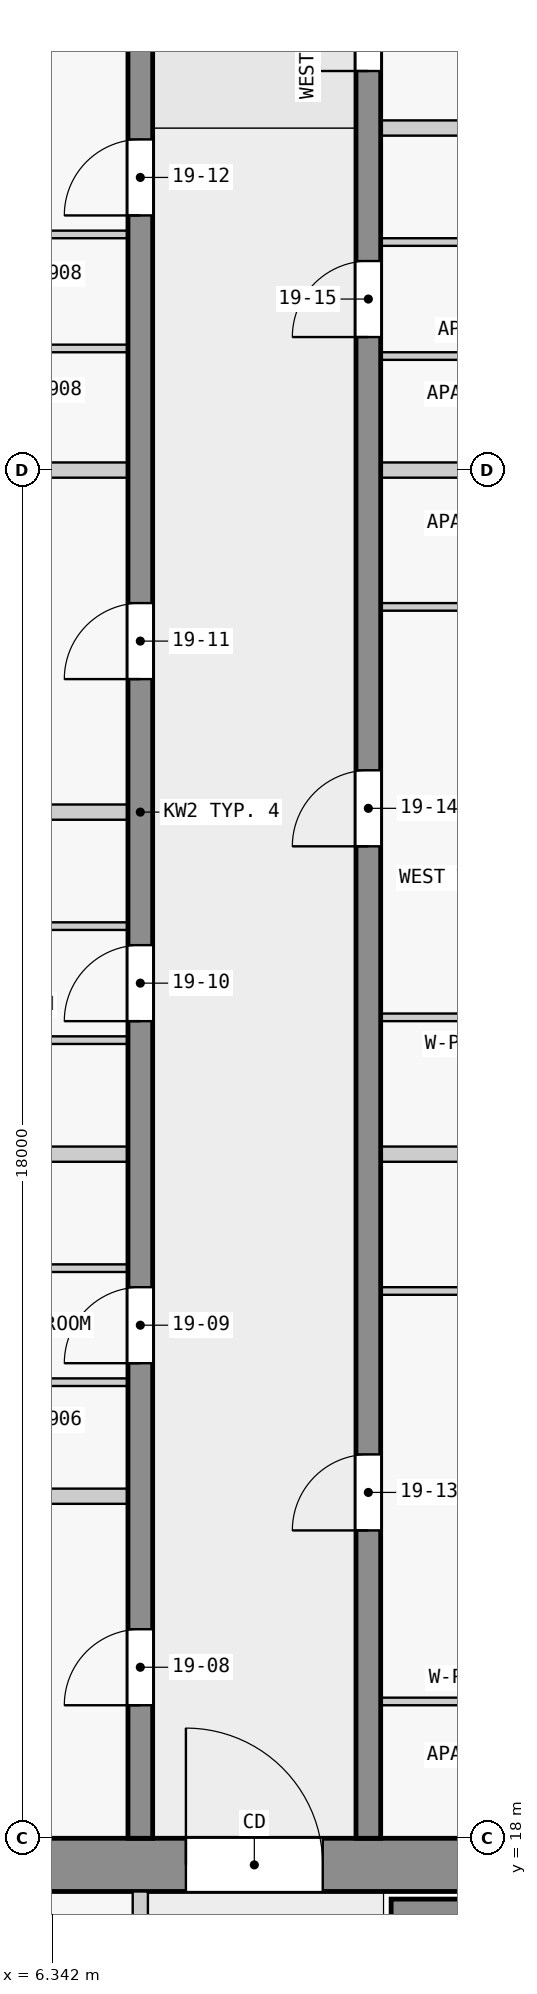
"""IFC4 building model, lengths in metres.
Left out: names, types, materials, properties, quantities, classifications, styles, units other than length and angle.
Written with IfcOpenShell. Run it as: python <this file> out.ifc"""

import sys

from ifc_helpers import new_model, si_unit, direction, frame, frame_2d, origin, place, context, subcontext, project, spatial, rectangle, extrude, element, fill, save


model = new_model("IFC4")
c1 = context("Model", 3, precision=1e-05, world=origin(), true_north=direction((0.0, 1.0)))
c2 = subcontext(c1, "Body", "Model", "MODEL_VIEW")
j1 = project(units=[si_unit("LENGTHUNIT", "METRE"), si_unit("PLANEANGLEUNIT", "RADIAN")], contexts=[c1])
p1 = place(None, origin())
s1 = spatial("IfcSite", under=j1, at=p1, CompositionType="ELEMENT")
p2 = place(p1, origin())
s2 = spatial("IfcBuilding", under=s1, at=p2, CompositionType="ELEMENT")
p3 = place(p2, frame((0.0, 0.0, 78.3)))
s3 = spatial("IfcBuildingStorey", under=s2, at=p3, CompositionType="ELEMENT", Elevation=78.3)
p4 = place(p3, frame((1.6, 17.65, 0.0), z_axis=(0.0, 0.0, 1.0), x_axis=(1.0, 0.0, 0.0)))
e1 = element("IfcWall", 1, at=p4, inside=s3, PredefinedType="SHEAR", context=c2, shape_type="SweptSolid", body=[
    extrude(rectangle(XDim=20.9, YDim=0.7, at=frame_2d((10.45, 0.0))), origin(), (0.0, 0.0, 1.0), 3.25),
])
p5 = place(p4, frame((6.5, 0.0, 0.0)))
e2 = element("IfcOpeningElement", 2, at=p5, cuts=e1, PredefinedType="OPENING", context=c2, shape_type="SweptSolid", body=[
    extrude(rectangle(XDim=1.8, YDim=2.1, at=frame_2d((0.9, 1.05))), frame((0.0, 0.36, 0.0), z_axis=(0.0, -1.0, 0.0), x_axis=(1.0, 0.0, 0.0)), (0.0, 0.0, 1.0), 0.72),
])
p6 = place(p3, frame((10.8, 17.05, 0.0), z_axis=(0.0, 0.0, 1.0), x_axis=(1.0, 0.0, 0.0)))
e3 = element("IfcWall", 3, at=p6, inside=s3, PredefinedType="SHEAR", context=c2, shape_type="SweptSolid", body=[
    extrude(rectangle(XDim=7.8, YDim=0.3, at=frame_2d((3.9, 0.0))), origin(), (0.0, 0.0, 1.0), 3.25),
])
p7 = place(p3, frame((7.5, 18.0, 0.0), z_axis=(0.0, 0.0, 1.0), x_axis=(0.0, 1.0, 0.0)))
e4 = element("IfcWall", 4, at=p7, inside=s3, PredefinedType="SHEAR", context=c2, shape_type="SweptSolid", body=[
    extrude(rectangle(XDim=27.0, YDim=0.325, at=frame_2d((13.5, 0.0))), origin(), (0.0, 0.0, 1.0), 3.25),
])
p8 = place(p7, frame((1.75, 0.0, 0.0)))
e5 = element("IfcOpeningElement", 5, at=p8, cuts=e4, PredefinedType="OPENING", context=c2, shape_type="SweptSolid", body=[
    extrude(rectangle(XDim=1.0, YDim=2.1, at=frame_2d((0.5, 1.05))), frame((0.0, 0.172, 0.0), z_axis=(0.0, -1.0, 0.0), x_axis=(1.0, 0.0, 0.0)), (0.0, 0.0, 1.0), 0.345),
])
p9 = place(p7, frame((6.25, 0.0, 0.0)))
e6 = element("IfcOpeningElement", 6, at=p9, cuts=e4, PredefinedType="OPENING", context=c2, shape_type="SweptSolid", body=[
    extrude(rectangle(XDim=1.0, YDim=2.1, at=frame_2d((0.5, 1.05))), frame((0.0, 0.172, 0.0), z_axis=(0.0, -1.0, 0.0), x_axis=(1.0, 0.0, 0.0)), (0.0, 0.0, 1.0), 0.345),
])
p10 = place(p7, frame((10.75, 0.0, 0.0)))
e7 = element("IfcOpeningElement", 7, at=p10, cuts=e4, PredefinedType="OPENING", context=c2, shape_type="SweptSolid", body=[
    extrude(rectangle(XDim=1.0, YDim=2.1, at=frame_2d((0.5, 1.05))), frame((0.0, 0.172, 0.0), z_axis=(0.0, -1.0, 0.0), x_axis=(1.0, 0.0, 0.0)), (0.0, 0.0, 1.0), 0.345),
])
p11 = place(p7, frame((15.25, 0.0, 0.0)))
e8 = element("IfcOpeningElement", 8, at=p11, cuts=e4, PredefinedType="OPENING", context=c2, shape_type="SweptSolid", body=[
    extrude(rectangle(XDim=1.0, YDim=2.1, at=frame_2d((0.5, 1.05))), frame((0.0, 0.172, 0.0), z_axis=(0.0, -1.0, 0.0), x_axis=(1.0, 0.0, 0.0)), (0.0, 0.0, 1.0), 0.345),
])
p12 = place(p7, frame((21.35, 0.0, 0.0)))
e9 = element("IfcOpeningElement", 9, at=p12, cuts=e4, PredefinedType="OPENING", context=c2, shape_type="SweptSolid", body=[
    extrude(rectangle(XDim=1.0, YDim=2.1, at=frame_2d((0.5, 1.05))), frame((0.0, 0.172, 0.0), z_axis=(0.0, -1.0, 0.0), x_axis=(1.0, 0.0, 0.0)), (0.0, 0.0, 1.0), 0.345),
])
p13 = place(p3, frame((10.5, 18.0, 0.0), z_axis=(0.0, 0.0, 1.0), x_axis=(0.0, 1.0, 0.0)))
e10 = element("IfcWall", 10, at=p13, inside=s3, PredefinedType="SHEAR", context=c2, shape_type="SweptSolid", body=[
    extrude(rectangle(XDim=27.0, YDim=0.325, at=frame_2d((13.5, 0.0))), origin(), (0.0, 0.0, 1.0), 3.25),
])
p14 = place(p13, frame((4.05, 0.0, 0.0)))
e11 = element("IfcOpeningElement", 11, at=p14, cuts=e10, PredefinedType="OPENING", context=c2, shape_type="SweptSolid", body=[
    extrude(rectangle(XDim=1.0, YDim=2.1, at=frame_2d((0.5, 1.05))), frame((0.0, 0.172, 0.0), z_axis=(0.0, -1.0, 0.0), x_axis=(1.0, 0.0, 0.0)), (0.0, 0.0, 1.0), 0.345),
])
p15 = place(p13, frame((13.05, 0.0, 0.0)))
e12 = element("IfcOpeningElement", 12, at=p15, cuts=e10, PredefinedType="OPENING", context=c2, shape_type="SweptSolid", body=[
    extrude(rectangle(XDim=1.0, YDim=2.1, at=frame_2d((0.5, 1.05))), frame((0.0, 0.172, 0.0), z_axis=(0.0, -1.0, 0.0), x_axis=(1.0, 0.0, 0.0)), (0.0, 0.0, 1.0), 0.345),
])
p16 = place(p13, frame((19.75, 0.0, 0.0)))
e13 = element("IfcOpeningElement", 13, at=p16, cuts=e10, PredefinedType="OPENING", context=c2, shape_type="SweptSolid", body=[
    extrude(rectangle(XDim=1.0, YDim=2.1, at=frame_2d((0.5, 1.05))), frame((0.0, 0.172, 0.0), z_axis=(0.0, -1.0, 0.0), x_axis=(1.0, 0.0, 0.0)), (0.0, 0.0, 1.0), 0.345),
])
p17 = place(p13, frame((23.25, 0.0, 0.0)))
e14 = element("IfcOpeningElement", 14, at=p17, cuts=e10, PredefinedType="OPENING", context=c2, shape_type="SweptSolid", body=[
    extrude(rectangle(XDim=0.9, YDim=2.1, at=frame_2d((0.45, 1.05))), frame((0.0, 0.172, 0.0), z_axis=(0.0, -1.0, 0.0), x_axis=(1.0, 0.0, 0.0)), (0.0, 0.0, 1.0), 0.345),
])
p18 = place(p13, frame((25.45, 0.0, 0.0)))
e15 = element("IfcOpeningElement", 15, at=p18, cuts=e10, PredefinedType="OPENING", context=c2, shape_type="SweptSolid", body=[
    extrude(rectangle(XDim=1.0, YDim=2.1, at=frame_2d((0.5, 1.05))), frame((0.0, 0.172, 0.0), z_axis=(0.0, -1.0, 0.0), x_axis=(1.0, 0.0, 0.0)), (0.0, 0.0, 1.0), 0.345),
])
p19 = place(p3, frame((7.5, 10.1, 0.0), z_axis=(0.0, 0.0, 1.0), x_axis=(0.0, 1.0, 0.0)))
e16 = element("IfcWall", 16, at=p19, inside=s3, PredefinedType="PARTITIONING", context=c2, shape_type="SweptSolid", body=[
    extrude(rectangle(XDim=7.2, YDim=0.2, at=frame_2d((3.6, 0.0))), origin(), (0.0, 0.0, 1.0), 3.25),
])
p20 = place(p19, frame((0.75, 0.0, 0.0)))
e17 = element("IfcOpeningElement", 17, at=p20, cuts=e16, PredefinedType="OPENING", context=c2, shape_type="SweptSolid", body=[
    extrude(rectangle(XDim=0.9, YDim=2.1, at=frame_2d((0.45, 1.05))), frame((0.0, 0.11, 0.0), z_axis=(0.0, -1.0, 0.0), x_axis=(1.0, 0.0, 0.0)), (0.0, 0.0, 1.0), 0.22),
])
p21 = place(p19, frame((4.35, 0.0, 0.0)))
e18 = element("IfcOpeningElement", 18, at=p21, cuts=e16, PredefinedType="OPENING", context=c2, shape_type="SweptSolid", body=[
    extrude(rectangle(XDim=0.9, YDim=2.1, at=frame_2d((0.45, 1.05))), frame((0.0, 0.11, 0.0), z_axis=(0.0, -1.0, 0.0), x_axis=(1.0, 0.0, 0.0)), (0.0, 0.0, 1.0), 0.22),
])
p22 = place(p3, frame((14.062, 19.8, 0.0), z_axis=(0.0, 0.0, 1.0), x_axis=(-1.0, 0.0, 0.0)))
e19 = element("IfcWall", 19, at=p22, inside=s3, PredefinedType="PARTITIONING", context=c2, shape_type="SweptSolid", body=[
    extrude(rectangle(XDim=3.4, YDim=0.1, at=frame_2d((1.7, 0.0))), origin(), (0.0, 0.0, 1.0), 3.25),
])
p23 = place(p22, frame((1.25, 0.0, 0.0)))
e20 = element("IfcOpeningElement", 20, at=p23, cuts=e19, PredefinedType="OPENING", context=c2, shape_type="SweptSolid", body=[
    extrude(rectangle(XDim=0.9, YDim=2.1, at=frame_2d((0.45, 1.05))), frame((0.0, 0.06, 0.0), z_axis=(0.0, -1.0, 0.0), x_axis=(1.0, 0.0, 0.0)), (0.0, 0.0, 1.0), 0.12),
])
p24 = place(p3, frame((7.337, 22.5, 0.0), z_axis=(0.0, 0.0, 1.0), x_axis=(-1.0, 0.0, 0.0)))
e21 = element("IfcWall", 21, at=p24, inside=s3, PredefinedType="PARTITIONING", context=c2, shape_type="SweptSolid", body=[
    extrude(rectangle(XDim=7.188, YDim=0.2, at=frame_2d((3.594, 0.0))), origin(), (0.0, 0.0, 1.0), 3.25),
])
p25 = place(p3, frame((7.337, 24.0, 0.0), z_axis=(0.0, 0.0, 1.0), x_axis=(-1.0, 0.0, 0.0)))
e22 = element("IfcWall", 22, at=p25, inside=s3, PredefinedType="PARTITIONING", context=c2, shape_type="SweptSolid", body=[
    extrude(rectangle(XDim=3.4, YDim=0.1, at=frame_2d((1.7, 0.0))), origin(), (0.0, 0.0, 1.0), 3.25),
])
p26 = place(p25, frame((1.25, 0.0, 0.0)))
e23 = element("IfcOpeningElement", 23, at=p26, cuts=e22, PredefinedType="OPENING", context=c2, shape_type="SweptSolid", body=[
    extrude(rectangle(XDim=0.9, YDim=2.1, at=frame_2d((0.45, 1.05))), frame((0.0, 0.06, 0.0), z_axis=(0.0, -1.0, 0.0), x_axis=(1.0, 0.0, 0.0)), (0.0, 0.0, 1.0), 0.12),
])
p27 = place(p3, frame((10.663, 25.2, 0.0), z_axis=(0.0, 0.0, 1.0), x_axis=(1.0, 0.0, 0.0)))
e24 = element("IfcWall", 24, at=p27, inside=s3, PredefinedType="PARTITIONING", context=c2, shape_type="SweptSolid", body=[
    extrude(rectangle(XDim=3.35, YDim=0.1, at=frame_2d((1.675, 0.0))), origin(), (0.0, 0.0, 1.0), 3.25),
])
p28 = place(p27, frame((1.25, 0.0, 0.0)))
e25 = element("IfcOpeningElement", 25, at=p28, cuts=e24, PredefinedType="OPENING", context=c2, shape_type="SweptSolid", body=[
    extrude(rectangle(XDim=0.9, YDim=2.1, at=frame_2d((0.45, 1.05))), frame((0.0, 0.06, 0.0), z_axis=(0.0, -1.0, 0.0), x_axis=(1.0, 0.0, 0.0)), (0.0, 0.0, 1.0), 0.12),
])
p29 = place(p3, frame((3.938, 25.5, 0.0), z_axis=(0.0, 0.0, 1.0), x_axis=(1.0, 0.0, 0.0)))
e26 = element("IfcWall", 26, at=p29, inside=s3, PredefinedType="PARTITIONING", context=c2, shape_type="SweptSolid", body=[
    extrude(rectangle(XDim=3.4, YDim=0.1, at=frame_2d((1.7, 0.0))), origin(), (0.0, 0.0, 1.0), 3.25),
])
p30 = place(p29, frame((1.25, 0.0, 0.0)))
e27 = element("IfcOpeningElement", 27, at=p30, cuts=e26, PredefinedType="OPENING", context=c2, shape_type="SweptSolid", body=[
    extrude(rectangle(XDim=0.9, YDim=2.1, at=frame_2d((0.45, 1.05))), frame((0.0, 0.06, 0.0), z_axis=(0.0, -1.0, 0.0), x_axis=(1.0, 0.0, 0.0)), (0.0, 0.0, 1.0), 0.12),
])
for number, where, z_axis, x_axis in (
    (28, (7.337, 27.0, 0.0), (0.0, 0.0, 1.0), (-1.0, 0.0, 0.0)),
    (29, (13.962, 27.0, 0.0), (0.0, 0.0, 1.0), (-1.0, 0.0, 0.0)),
):
    element("IfcWall", number, at=place(p3, frame(where, z_axis=z_axis, x_axis=x_axis)), inside=s3, PredefinedType="PARTITIONING", context=c2, shape_type="SweptSolid", body=[
        extrude(rectangle(XDim=3.3, YDim=0.2, at=frame_2d((1.65, 0.0))), origin(), (0.0, 0.0, 1.0), 3.25),
    ])
p31 = place(p3, frame((7.337, 28.5, 0.0), z_axis=(0.0, 0.0, 1.0), x_axis=(-1.0, 0.0, 0.0)))
e30 = element("IfcWall", 30, at=p31, inside=s3, PredefinedType="PARTITIONING", context=c2, shape_type="SweptSolid", body=[
    extrude(rectangle(XDim=3.4, YDim=0.1, at=frame_2d((1.7, 0.0))), origin(), (0.0, 0.0, 1.0), 3.25),
])
p32 = place(p31, frame((1.25, 0.0, 0.0)))
e31 = element("IfcOpeningElement", 31, at=p32, cuts=e30, PredefinedType="OPENING", context=c2, shape_type="SweptSolid", body=[
    extrude(rectangle(XDim=0.9, YDim=2.1, at=frame_2d((0.45, 1.05))), frame((0.0, 0.06, 0.0), z_axis=(0.0, -1.0, 0.0), x_axis=(1.0, 0.0, 0.0)), (0.0, 0.0, 1.0), 0.12),
])
p33 = place(p3, frame((14.012, 28.8, 0.0), z_axis=(0.0, 0.0, 1.0), x_axis=(-1.0, 0.0, 0.0)))
e32 = element("IfcWall", 32, at=p33, inside=s3, PredefinedType="PARTITIONING", context=c2, shape_type="SweptSolid", body=[
    extrude(rectangle(XDim=3.35, YDim=0.1, at=frame_2d((1.675, 0.0))), origin(), (0.0, 0.0, 1.0), 3.25),
])
p34 = place(p33, frame((1.25, 0.0, 0.0)))
e33 = element("IfcOpeningElement", 33, at=p34, cuts=e32, PredefinedType="OPENING", context=c2, shape_type="SweptSolid", body=[
    extrude(rectangle(XDim=0.9, YDim=2.1, at=frame_2d((0.45, 1.05))), frame((0.0, 0.06, 0.0), z_axis=(0.0, -1.0, 0.0), x_axis=(1.0, 0.0, 0.0)), (0.0, 0.0, 1.0), 0.12),
])
p35 = place(p3, frame((3.938, 30.0, 0.0), z_axis=(0.0, 0.0, 1.0), x_axis=(1.0, 0.0, 0.0)))
e34 = element("IfcWall", 34, at=p35, inside=s3, PredefinedType="PARTITIONING", context=c2, shape_type="SweptSolid", body=[
    extrude(rectangle(XDim=3.4, YDim=0.1, at=frame_2d((1.7, 0.0))), origin(), (0.0, 0.0, 1.0), 3.25),
])
p36 = place(p35, frame((1.25, 0.0, 0.0)))
e35 = element("IfcOpeningElement", 35, at=p36, cuts=e34, PredefinedType="OPENING", context=c2, shape_type="SweptSolid", body=[
    extrude(rectangle(XDim=0.9, YDim=2.1, at=frame_2d((0.45, 1.05))), frame((0.0, 0.06, 0.0), z_axis=(0.0, -1.0, 0.0), x_axis=(1.0, 0.0, 0.0)), (0.0, 0.0, 1.0), 0.12),
])
p37 = place(p3, frame((7.337, 31.5, 0.0), z_axis=(0.0, 0.0, 1.0), x_axis=(-1.0, 0.0, 0.0)))
e36 = element("IfcWall", 36, at=p37, inside=s3, PredefinedType="PARTITIONING", context=c2, shape_type="SweptSolid", body=[
    extrude(rectangle(XDim=3.3, YDim=0.2, at=frame_2d((1.65, 0.0))), origin(), (0.0, 0.0, 1.0), 3.25),
])
p38 = place(p3, frame((10.663, 34.2, 0.0), z_axis=(0.0, 0.0, 1.0), x_axis=(1.0, 0.0, 0.0)))
e37 = element("IfcWall", 37, at=p38, inside=s3, PredefinedType="PARTITIONING", context=c2, shape_type="SweptSolid", body=[
    extrude(rectangle(XDim=3.4, YDim=0.1, at=frame_2d((1.7, 0.0))), origin(), (0.0, 0.0, 1.0), 3.25),
])
p39 = place(p38, frame((1.25, 0.0, 0.0)))
e38 = element("IfcOpeningElement", 38, at=p39, cuts=e37, PredefinedType="OPENING", context=c2, shape_type="SweptSolid", body=[
    extrude(rectangle(XDim=0.9, YDim=2.1, at=frame_2d((0.45, 1.05))), frame((0.0, 0.06, 0.0), z_axis=(0.0, -1.0, 0.0), x_axis=(1.0, 0.0, 0.0)), (0.0, 0.0, 1.0), 0.12),
])
p40 = place(p3, frame((7.337, 36.0, 0.0), z_axis=(0.0, 0.0, 1.0), x_axis=(-1.0, 0.0, 0.0)))
e39 = element("IfcWall", 39, at=p40, inside=s3, PredefinedType="PARTITIONING", context=c2, shape_type="SweptSolid", body=[
    extrude(rectangle(XDim=5.938, YDim=0.2, at=frame_2d((2.969, 0.0))), origin(), (0.0, 0.0, 1.0), 3.25),
])
p41 = place(p3, frame((14.062, 36.0, 0.0), z_axis=(0.0, 0.0, 1.0), x_axis=(-1.0, 0.0, 0.0)))
e40 = element("IfcWall", 40, at=p41, inside=s3, PredefinedType="PARTITIONING", context=c2, shape_type="SweptSolid", body=[
    extrude(rectangle(XDim=3.4, YDim=0.2, at=frame_2d((1.7, 0.0))), origin(), (0.0, 0.0, 1.0), 3.25),
])
p42 = place(p3, frame((14.062, 37.5, 0.0), z_axis=(0.0, 0.0, 1.0), x_axis=(-1.0, 0.0, 0.0)))
e41 = element("IfcWall", 41, at=p42, inside=s3, PredefinedType="PARTITIONING", context=c2, shape_type="SweptSolid", body=[
    extrude(rectangle(XDim=3.4, YDim=0.1, at=frame_2d((1.7, 0.0))), origin(), (0.0, 0.0, 1.0), 3.25),
])
p43 = place(p42, frame((1.25, 0.0, 0.0)))
e42 = element("IfcOpeningElement", 42, at=p43, cuts=e41, PredefinedType="OPENING", context=c2, shape_type="SweptSolid", body=[
    extrude(rectangle(XDim=0.9, YDim=2.1, at=frame_2d((0.45, 1.05))), frame((0.0, 0.06, 0.0), z_axis=(0.0, -1.0, 0.0), x_axis=(1.0, 0.0, 0.0)), (0.0, 0.0, 1.0), 0.12),
])
p44 = place(p3, frame((7.337, 37.6, 0.0), z_axis=(0.0, 0.0, 1.0), x_axis=(-1.0, 0.0, 0.0)))
e43 = element("IfcWall", 43, at=p44, inside=s3, PredefinedType="PARTITIONING", context=c2, shape_type="SweptSolid", body=[
    extrude(rectangle(XDim=3.4, YDim=0.1, at=frame_2d((1.7, 0.0))), origin(), (0.0, 0.0, 1.0), 3.25),
])
p45 = place(p3, frame((10.663, 39.0, 0.0), z_axis=(0.0, 0.0, 1.0), x_axis=(1.0, 0.0, 0.0)))
e44 = element("IfcWall", 44, at=p45, inside=s3, PredefinedType="PARTITIONING", context=c2, shape_type="SweptSolid", body=[
    extrude(rectangle(XDim=3.4, YDim=0.1, at=frame_2d((1.7, 0.0))), origin(), (0.0, 0.0, 1.0), 3.25),
])
p46 = place(p45, frame((1.25, 0.0, 0.0)))
e45 = element("IfcOpeningElement", 45, at=p46, cuts=e44, PredefinedType="OPENING", context=c2, shape_type="SweptSolid", body=[
    extrude(rectangle(XDim=0.9, YDim=2.1, at=frame_2d((0.45, 1.05))), frame((0.0, 0.06, 0.0), z_axis=(0.0, -1.0, 0.0), x_axis=(1.0, 0.0, 0.0)), (0.0, 0.0, 1.0), 0.12),
])
p47 = place(p3, frame((7.337, 39.1, 0.0), z_axis=(0.0, 0.0, 1.0), x_axis=(-1.0, 0.0, 0.0)))
e46 = element("IfcWall", 46, at=p47, inside=s3, PredefinedType="PARTITIONING", context=c2, shape_type="SweptSolid", body=[
    extrude(rectangle(XDim=3.4, YDim=0.1, at=frame_2d((1.7, 0.0))), origin(), (0.0, 0.0, 1.0), 3.25),
])
p48 = place(p47, frame((1.25, 0.0, 0.0)))
e47 = element("IfcOpeningElement", 47, at=p48, cuts=e46, PredefinedType="OPENING", context=c2, shape_type="SweptSolid", body=[
    extrude(rectangle(XDim=0.9, YDim=2.1, at=frame_2d((0.45, 1.05))), frame((0.0, 0.06, 0.0), z_axis=(0.0, -1.0, 0.0), x_axis=(1.0, 0.0, 0.0)), (0.0, 0.0, 1.0), 0.12),
])
p49 = place(p3, frame((13.962, 40.5, 0.0), z_axis=(0.0, 0.0, 1.0), x_axis=(-1.0, 0.0, 0.0)))
e48 = element("IfcWall", 48, at=p49, inside=s3, PredefinedType="PARTITIONING", context=c2, shape_type="SweptSolid", body=[
    extrude(rectangle(XDim=3.3, YDim=0.2, at=frame_2d((1.65, 0.0))), origin(), (0.0, 0.0, 1.0), 3.25),
])
p50 = place(p5, origin())
e49 = element("IfcDoor", 49, at=p50, inside=s3, OperationType="DOUBLE_DOOR_SINGLE_SWING", PredefinedType="DOOR", context=c2, shape_type="SweptSolid", body=[
    extrude(rectangle(XDim=1.8, YDim=2.1, at=frame_2d((0.9, 1.05))), frame((0.0, 0.025, 0.0), z_axis=(0.0, -1.0, 0.0), x_axis=(1.0, 0.0, 0.0)), (0.0, 0.0, 1.0), 0.05),
])
fill(e2, e49)
p51 = place(p8, origin())
e50 = element("IfcDoor", 50, at=p51, inside=s3, OperationType="SINGLE_SWING_LEFT", PredefinedType="DOOR", context=c2, shape_type="SweptSolid", body=[
    extrude(rectangle(XDim=1.0, YDim=2.1, at=frame_2d((0.5, 1.05))), frame((0.0, 0.025, 0.0), z_axis=(0.0, -1.0, 0.0), x_axis=(1.0, 0.0, 0.0)), (0.0, 0.0, 1.0), 0.05),
])
fill(e5, e50)
p52 = place(p9, origin())
e51 = element("IfcDoor", 51, at=p52, inside=s3, OperationType="SINGLE_SWING_LEFT", PredefinedType="DOOR", context=c2, shape_type="SweptSolid", body=[
    extrude(rectangle(XDim=1.0, YDim=2.1, at=frame_2d((0.5, 1.05))), frame((0.0, 0.025, 0.0), z_axis=(0.0, -1.0, 0.0), x_axis=(1.0, 0.0, 0.0)), (0.0, 0.0, 1.0), 0.05),
])
fill(e6, e51)
p53 = place(p10, origin())
e52 = element("IfcDoor", 52, at=p53, inside=s3, OperationType="SINGLE_SWING_LEFT", PredefinedType="DOOR", context=c2, shape_type="SweptSolid", body=[
    extrude(rectangle(XDim=1.0, YDim=2.1, at=frame_2d((0.5, 1.05))), frame((0.0, 0.025, 0.0), z_axis=(0.0, -1.0, 0.0), x_axis=(1.0, 0.0, 0.0)), (0.0, 0.0, 1.0), 0.05),
])
fill(e7, e52)
p54 = place(p11, origin())
e53 = element("IfcDoor", 53, at=p54, inside=s3, OperationType="SINGLE_SWING_RIGHT", PredefinedType="DOOR", context=c2, shape_type="SweptSolid", body=[
    extrude(rectangle(XDim=1.0, YDim=2.1, at=frame_2d((0.5, 1.05))), frame((0.0, 0.025, 0.0), z_axis=(0.0, -1.0, 0.0), x_axis=(1.0, 0.0, 0.0)), (0.0, 0.0, 1.0), 0.05),
])
fill(e8, e53)
p55 = place(p12, origin())
e54 = element("IfcDoor", 54, at=p55, inside=s3, OperationType="SINGLE_SWING_RIGHT", PredefinedType="DOOR", context=c2, shape_type="SweptSolid", body=[
    extrude(rectangle(XDim=1.0, YDim=2.1, at=frame_2d((0.5, 1.05))), frame((0.0, 0.025, 0.0), z_axis=(0.0, -1.0, 0.0), x_axis=(1.0, 0.0, 0.0)), (0.0, 0.0, 1.0), 0.05),
])
fill(e9, e54)
p56 = place(p14, origin())
e55 = element("IfcDoor", 55, at=p56, inside=s3, OperationType="SINGLE_SWING_LEFT", PredefinedType="DOOR", context=c2, shape_type="SweptSolid", body=[
    extrude(rectangle(XDim=1.0, YDim=2.1, at=frame_2d((0.5, 1.05))), frame((0.0, 0.025, 0.0), z_axis=(0.0, -1.0, 0.0), x_axis=(1.0, 0.0, 0.0)), (0.0, 0.0, 1.0), 0.05),
])
fill(e11, e55)
p57 = place(p15, origin())
e56 = element("IfcDoor", 56, at=p57, inside=s3, OperationType="SINGLE_SWING_RIGHT", PredefinedType="DOOR", context=c2, shape_type="SweptSolid", body=[
    extrude(rectangle(XDim=1.0, YDim=2.1, at=frame_2d((0.5, 1.05))), frame((0.0, 0.025, 0.0), z_axis=(0.0, -1.0, 0.0), x_axis=(1.0, 0.0, 0.0)), (0.0, 0.0, 1.0), 0.05),
])
fill(e12, e56)
p58 = place(p16, origin())
e57 = element("IfcDoor", 57, at=p58, inside=s3, OperationType="SINGLE_SWING_RIGHT", PredefinedType="DOOR", context=c2, shape_type="SweptSolid", body=[
    extrude(rectangle(XDim=1.0, YDim=2.1, at=frame_2d((0.5, 1.05))), frame((0.0, 0.025, 0.0), z_axis=(0.0, -1.0, 0.0), x_axis=(1.0, 0.0, 0.0)), (0.0, 0.0, 1.0), 0.05),
])
fill(e13, e57)
p59 = place(p17, origin())
e58 = element("IfcDoor", 58, at=p59, inside=s3, OperationType="SINGLE_SWING_RIGHT", PredefinedType="DOOR", context=c2, shape_type="SweptSolid", body=[
    extrude(rectangle(XDim=0.9, YDim=2.1, at=frame_2d((0.45, 1.05))), frame((0.0, 0.025, 0.0), z_axis=(0.0, -1.0, 0.0), x_axis=(1.0, 0.0, 0.0)), (0.0, 0.0, 1.0), 0.05),
])
fill(e14, e58)
save(model, sys.argv[1])
